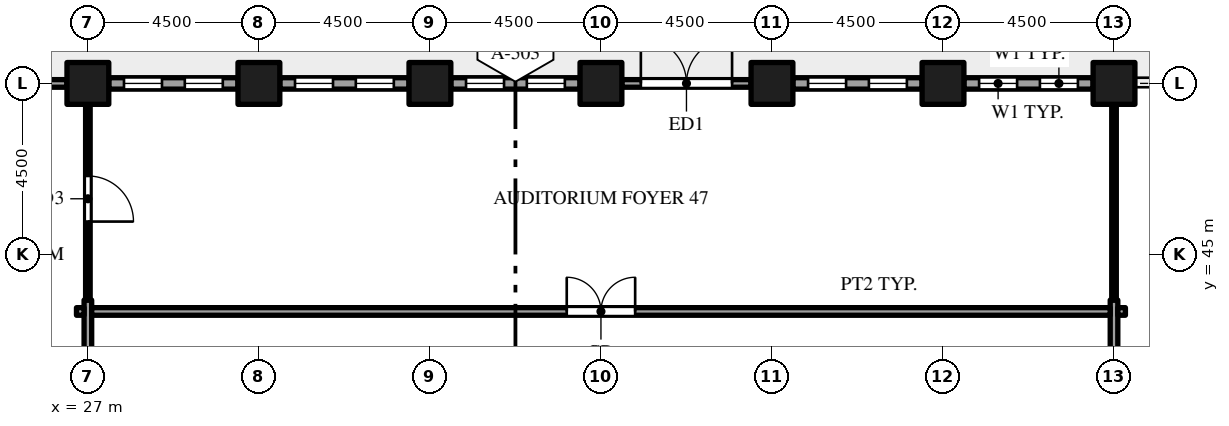
"""IFC4 building model, lengths in metres.
Left out: names, types, materials, properties, quantities, classifications, styles, units other than length and angle.
Written with IfcOpenShell. Run it as: python <this file> out.ifc"""

import sys

from ifc_helpers import new_model, si_unit, direction, frame, frame_2d, origin, origin_2d, place, context, subcontext, project, spatial, rectangle, hollow_rectangle, extrude, element, fill, save


model = new_model("IFC4")
c1 = context("Model", 3, precision=1e-05, world=origin(), true_north=direction((0.0, 1.0)))
c2 = subcontext(c1, "Body", "Model", "MODEL_VIEW")
j1 = project(units=[si_unit("LENGTHUNIT", "METRE"), si_unit("PLANEANGLEUNIT", "RADIAN")], contexts=[c1])
p1 = place(None, origin())
s1 = spatial("IfcSite", under=j1, at=p1, CompositionType="ELEMENT")
p2 = place(p1, origin())
s2 = spatial("IfcBuilding", under=s1, at=p2, CompositionType="ELEMENT")
p3 = place(p2, origin())
s3 = spatial("IfcBuildingStorey", under=s2, at=p3, CompositionType="ELEMENT", Elevation=0.0)
for number, where, z_axis, x_axis in (
    (1, (27.0, 49.5, -0.3), (0.0, 0.0, 1.0), (1.0, 0.0, 0.0)),
    (2, (31.5, 49.5, -0.3), (0.0, 0.0, 1.0), (1.0, 0.0, 0.0)),
    (3, (36.0, 49.5, -0.3), (0.0, 0.0, 1.0), (1.0, 0.0, 0.0)),
    (4, (40.5, 49.5, -0.3), (0.0, 0.0, 1.0), (1.0, 0.0, 0.0)),
    (5, (45.0, 49.5, -0.3), (0.0, 0.0, 1.0), (1.0, 0.0, 0.0)),
    (6, (49.5, 49.5, -0.3), (0.0, 0.0, 1.0), (1.0, 0.0, 0.0)),
    (7, (54.0, 49.5, -0.3), (0.0, 0.0, 1.0), (1.0, 0.0, 0.0)),
):
    element("IfcColumn", number, at=place(p3, frame(where, z_axis=z_axis, x_axis=x_axis)), inside=s3, PredefinedType="COLUMN", context=c2, shape_type="SweptSolid", body=[
        extrude(hollow_rectangle(XDim=1.1, YDim=1.1, WallThickness=0.06, at=origin_2d()), origin(), (0.0, 0.0, 1.0), 8.05),
    ])
p4 = place(p3, frame((53.45, 49.5, 0.0), z_axis=(0.0, 0.0, 1.0), x_axis=(-1.0, 0.0, 0.0)))
e8 = element("IfcWall", 8, at=p4, inside=s3, PredefinedType="STANDARD", context=c2, shape_type="SweptSolid", body=[
    extrude(rectangle(XDim=3.4, YDim=0.3, at=frame_2d((1.7, 0.0))), origin(), (0.0, 0.0, 1.0), 7.036),
])
p5 = place(p4, frame((0.4, 0.0, 0.9)))
e9 = element("IfcOpeningElement", 9, at=p5, cuts=e8, PredefinedType="OPENING", context=c2, shape_type="SweptSolid", body=[
    extrude(rectangle(XDim=1.0, YDim=3.5, at=frame_2d((0.5, 1.75))), frame((0.0, 0.16, 0.0), z_axis=(0.0, -1.0, 0.0), x_axis=(1.0, 0.0, 0.0)), (0.0, 0.0, 1.0), 0.32),
])
p6 = place(p4, frame((2.0, 0.0, 0.9)))
e10 = element("IfcOpeningElement", 10, at=p6, cuts=e8, PredefinedType="OPENING", context=c2, shape_type="SweptSolid", body=[
    extrude(rectangle(XDim=1.0, YDim=3.5, at=frame_2d((0.5, 1.75))), frame((0.0, 0.16, 0.0), z_axis=(0.0, -1.0, 0.0), x_axis=(1.0, 0.0, 0.0)), (0.0, 0.0, 1.0), 0.32),
])
p7 = place(p3, frame((48.95, 49.5, 0.0), z_axis=(0.0, 0.0, 1.0), x_axis=(-1.0, 0.0, 0.0)))
e11 = element("IfcWall", 11, at=p7, inside=s3, PredefinedType="STANDARD", context=c2, shape_type="SweptSolid", body=[
    extrude(rectangle(XDim=3.4, YDim=0.3, at=frame_2d((1.7, 0.0))), origin(), (0.0, 0.0, 1.0), 7.036),
])
p8 = place(p7, frame((0.4, 0.0, 0.9)))
e12 = element("IfcOpeningElement", 12, at=p8, cuts=e11, PredefinedType="OPENING", context=c2, shape_type="SweptSolid", body=[
    extrude(rectangle(XDim=1.0, YDim=3.5, at=frame_2d((0.5, 1.75))), frame((0.0, 0.16, 0.0), z_axis=(0.0, -1.0, 0.0), x_axis=(1.0, 0.0, 0.0)), (0.0, 0.0, 1.0), 0.32),
])
p9 = place(p7, frame((2.0, 0.0, 0.9)))
e13 = element("IfcOpeningElement", 13, at=p9, cuts=e11, PredefinedType="OPENING", context=c2, shape_type="SweptSolid", body=[
    extrude(rectangle(XDim=1.0, YDim=3.5, at=frame_2d((0.5, 1.75))), frame((0.0, 0.16, 0.0), z_axis=(0.0, -1.0, 0.0), x_axis=(1.0, 0.0, 0.0)), (0.0, 0.0, 1.0), 0.32),
])
p10 = place(p3, frame((41.05, 49.5, 0.0), z_axis=(0.0, 0.0, 1.0), x_axis=(1.0, 0.0, 0.0)))
e14 = element("IfcWall", 14, at=p10, inside=s3, PredefinedType="STANDARD", context=c2, shape_type="SweptSolid", body=[
    extrude(rectangle(XDim=3.4, YDim=0.2, at=frame_2d((1.7, 0.0))), origin(), (0.0, 0.0, 1.0), 7.036),
])
p11 = place(p10, frame((0.5, 0.0, 0.0)))
e15 = element("IfcOpeningElement", 15, at=p11, cuts=e14, PredefinedType="OPENING", context=c2, shape_type="SweptSolid", body=[
    extrude(rectangle(XDim=2.4, YDim=3.0, at=frame_2d((1.2, 1.5))), frame((0.0, 0.11, 0.0), z_axis=(0.0, -1.0, 0.0), x_axis=(1.0, 0.0, 0.0)), (0.0, 0.0, 1.0), 0.22),
])
p12 = place(p3, frame((39.95, 49.5, 0.0), z_axis=(0.0, 0.0, 1.0), x_axis=(-1.0, 0.0, 0.0)))
e16 = element("IfcWall", 16, at=p12, inside=s3, PredefinedType="STANDARD", context=c2, shape_type="SweptSolid", body=[
    extrude(rectangle(XDim=3.4, YDim=0.3, at=frame_2d((1.7, 0.0))), origin(), (0.0, 0.0, 1.0), 7.036),
])
p13 = place(p12, frame((0.4, 0.0, 0.9)))
e17 = element("IfcOpeningElement", 17, at=p13, cuts=e16, PredefinedType="OPENING", context=c2, shape_type="SweptSolid", body=[
    extrude(rectangle(XDim=1.0, YDim=3.5, at=frame_2d((0.5, 1.75))), frame((0.0, 0.16, 0.0), z_axis=(0.0, -1.0, 0.0), x_axis=(1.0, 0.0, 0.0)), (0.0, 0.0, 1.0), 0.32),
])
p14 = place(p12, frame((2.0, 0.0, 0.9)))
e18 = element("IfcOpeningElement", 18, at=p14, cuts=e16, PredefinedType="OPENING", context=c2, shape_type="SweptSolid", body=[
    extrude(rectangle(XDim=1.0, YDim=3.5, at=frame_2d((0.5, 1.75))), frame((0.0, 0.16, 0.0), z_axis=(0.0, -1.0, 0.0), x_axis=(1.0, 0.0, 0.0)), (0.0, 0.0, 1.0), 0.32),
])
p15 = place(p3, frame((35.45, 49.5, 0.0), z_axis=(0.0, 0.0, 1.0), x_axis=(-1.0, 0.0, 0.0)))
e19 = element("IfcWall", 19, at=p15, inside=s3, PredefinedType="STANDARD", context=c2, shape_type="SweptSolid", body=[
    extrude(rectangle(XDim=3.4, YDim=0.3, at=frame_2d((1.7, 0.0))), origin(), (0.0, 0.0, 1.0), 7.036),
])
p16 = place(p15, frame((0.4, 0.0, 0.9)))
e20 = element("IfcOpeningElement", 20, at=p16, cuts=e19, PredefinedType="OPENING", context=c2, shape_type="SweptSolid", body=[
    extrude(rectangle(XDim=1.0, YDim=3.5, at=frame_2d((0.5, 1.75))), frame((0.0, 0.16, 0.0), z_axis=(0.0, -1.0, 0.0), x_axis=(1.0, 0.0, 0.0)), (0.0, 0.0, 1.0), 0.32),
])
p17 = place(p15, frame((2.0, 0.0, 0.9)))
e21 = element("IfcOpeningElement", 21, at=p17, cuts=e19, PredefinedType="OPENING", context=c2, shape_type="SweptSolid", body=[
    extrude(rectangle(XDim=1.0, YDim=3.5, at=frame_2d((0.5, 1.75))), frame((0.0, 0.16, 0.0), z_axis=(0.0, -1.0, 0.0), x_axis=(1.0, 0.0, 0.0)), (0.0, 0.0, 1.0), 0.32),
])
p18 = place(p3, frame((30.95, 49.5, 0.0), z_axis=(0.0, 0.0, 1.0), x_axis=(-1.0, 0.0, 0.0)))
e22 = element("IfcWall", 22, at=p18, inside=s3, PredefinedType="STANDARD", context=c2, shape_type="SweptSolid", body=[
    extrude(rectangle(XDim=3.4, YDim=0.3, at=frame_2d((1.7, 0.0))), origin(), (0.0, 0.0, 1.0), 7.036),
])
p19 = place(p18, frame((0.4, 0.0, 0.9)))
e23 = element("IfcOpeningElement", 23, at=p19, cuts=e22, PredefinedType="OPENING", context=c2, shape_type="SweptSolid", body=[
    extrude(rectangle(XDim=1.0, YDim=3.5, at=frame_2d((0.5, 1.75))), frame((0.0, 0.16, 0.0), z_axis=(0.0, -1.0, 0.0), x_axis=(1.0, 0.0, 0.0)), (0.0, 0.0, 1.0), 0.32),
])
p20 = place(p18, frame((2.0, 0.0, 0.9)))
e24 = element("IfcOpeningElement", 24, at=p20, cuts=e22, PredefinedType="OPENING", context=c2, shape_type="SweptSolid", body=[
    extrude(rectangle(XDim=1.0, YDim=3.5, at=frame_2d((0.5, 1.75))), frame((0.0, 0.16, 0.0), z_axis=(0.0, -1.0, 0.0), x_axis=(1.0, 0.0, 0.0)), (0.0, 0.0, 1.0), 0.32),
])
p21 = place(p3, frame((22.501, 49.5, 0.0), z_axis=(0.0, 0.0, 1.0), x_axis=(1.0, 0.0, 0.0)))
e25 = element("IfcWall", 25, at=p21, inside=s3, PredefinedType="STANDARD", context=c2, shape_type="SweptSolid", body=[
    extrude(rectangle(XDim=3.949, YDim=0.2, at=frame_2d((1.975, 0.0))), origin(), (0.0, 0.0, 1.0), 7.036),
])
p22 = place(p21, frame((0.774, 0.0, 0.0)))
e26 = element("IfcOpeningElement", 26, at=p22, cuts=e25, PredefinedType="OPENING", context=c2, shape_type="SweptSolid", body=[
    extrude(rectangle(XDim=2.4, YDim=3.0, at=frame_2d((1.2, 1.5))), frame((0.0, 0.11, 0.0), z_axis=(0.0, -1.0, 0.0), x_axis=(1.0, 0.0, 0.0)), (0.0, 0.0, 1.0), 0.22),
])
p23 = place(p3, frame((27.0, 26.7, 0.0), z_axis=(0.0, 0.0, 1.0), x_axis=(0.0, 1.0, 0.0)))
e27 = element("IfcWall", 27, at=p23, inside=s3, PredefinedType="PARTITIONING", context=c2, shape_type="SweptSolid", body=[
    extrude(rectangle(XDim=17.1, YDim=0.2, at=frame_2d((8.55, 0.0))), origin(), (0.0, 0.0, 1.0), 6.66),
])
p24 = place(p3, frame((27.0, 43.8, 0.0), z_axis=(0.0, 0.0, 1.0), x_axis=(0.0, 1.0, 0.0)))
e28 = element("IfcWall", 28, at=p24, inside=s3, PredefinedType="PARTITIONING", context=c2, shape_type="SweptSolid", body=[
    extrude(rectangle(XDim=5.55, YDim=0.12, at=frame_2d((2.775, 0.0))), origin(), (0.0, 0.0, 1.0), 6.66),
])
p25 = place(p24, frame((2.065, 0.0, 0.0)))
e29 = element("IfcOpeningElement", 29, at=p25, cuts=e28, PredefinedType="OPENING", context=c2, shape_type="SweptSolid", body=[
    extrude(rectangle(XDim=1.2, YDim=2.1, at=frame_2d((0.6, 1.05))), frame((0.0, 0.07, 0.0), z_axis=(0.0, -1.0, 0.0), x_axis=(1.0, 0.0, 0.0)), (0.0, 0.0, 1.0), 0.14),
])
p26 = place(p3, frame((54.0, 26.7, 0.0), z_axis=(0.0, 0.0, 1.0), x_axis=(0.0, 1.0, 0.0)))
e30 = element("IfcWall", 30, at=p26, inside=s3, PredefinedType="PARTITIONING", context=c2, shape_type="SweptSolid", body=[
    extrude(rectangle(XDim=17.1, YDim=0.2, at=frame_2d((8.55, 0.0))), origin(), (0.0, 0.0, 1.0), 6.66),
])
p27 = place(p26, frame((7.65, 0.0, 0.0)))
e31 = element("IfcOpeningElement", 31, at=p27, cuts=e30, PredefinedType="OPENING", context=c2, shape_type="SweptSolid", body=[
    extrude(rectangle(XDim=1.8, YDim=2.1, at=frame_2d((0.9, 1.05))), frame((0.0, 0.11, 0.0), z_axis=(0.0, -1.0, 0.0), x_axis=(1.0, 0.0, 0.0)), (0.0, 0.0, 1.0), 0.22),
])
p28 = place(p3, frame((54.0, 43.8, 0.0), z_axis=(0.0, 0.0, 1.0), x_axis=(0.0, 1.0, 0.0)))
e32 = element("IfcWall", 32, at=p28, inside=s3, PredefinedType="PARTITIONING", context=c2, shape_type="SweptSolid", body=[
    extrude(rectangle(XDim=5.55, YDim=0.12, at=frame_2d((2.775, 0.0))), origin(), (0.0, 0.0, 1.0), 6.66),
])
p29 = place(p3, frame((26.7, 43.5, 0.0), z_axis=(0.0, 0.0, 1.0), x_axis=(1.0, 0.0, 0.0)))
e33 = element("IfcWall", 33, at=p29, inside=s3, PredefinedType="PARTITIONING", context=c2, shape_type="SweptSolid", body=[
    extrude(rectangle(XDim=0.2, YDim=0.2, at=frame_2d((0.1, 0.0))), origin(), (0.0, 0.0, 1.0), 6.66),
])
p30 = place(p3, frame((27.1, 43.5, 0.0), z_axis=(0.0, 0.0, 1.0), x_axis=(1.0, 0.0, 0.0)))
e34 = element("IfcWall", 34, at=p30, inside=s3, PredefinedType="PARTITIONING", context=c2, shape_type="SweptSolid", body=[
    extrude(rectangle(XDim=26.8, YDim=0.2, at=frame_2d((13.4, 0.0))), origin(), (0.0, 0.0, 1.0), 6.66),
])
p31 = place(p30, frame((12.5, 0.0, 0.0)))
e35 = element("IfcOpeningElement", 35, at=p31, cuts=e34, PredefinedType="OPENING", context=c2, shape_type="SweptSolid", body=[
    extrude(rectangle(XDim=1.8, YDim=2.1, at=frame_2d((0.9, 1.05))), frame((0.0, 0.11, 0.0), z_axis=(0.0, -1.0, 0.0), x_axis=(1.0, 0.0, 0.0)), (0.0, 0.0, 1.0), 0.22),
])
p32 = place(p3, frame((54.1, 43.5, 0.0), z_axis=(0.0, 0.0, 1.0), x_axis=(1.0, 0.0, 0.0)))
e36 = element("IfcWall", 36, at=p32, inside=s3, PredefinedType="PARTITIONING", context=c2, shape_type="SweptSolid", body=[
    extrude(rectangle(XDim=0.2, YDim=0.2, at=frame_2d((0.1, 0.0))), origin(), (0.0, 0.0, 1.0), 6.66),
])
p33 = place(p5, origin())
e37 = element("IfcWindow", 37, at=p33, inside=s3, PartitioningType="SINGLE_PANEL", PredefinedType="WINDOW", context=c2, shape_type="SweptSolid", body=[
    extrude(rectangle(XDim=1.0, YDim=3.5, at=frame_2d((0.5, 1.75))), frame((0.0, 0.03, 0.0), z_axis=(0.0, -1.0, 0.0), x_axis=(1.0, 0.0, 0.0)), (0.0, 0.0, 1.0), 0.06),
])
fill(e9, e37)
p34 = place(p6, origin())
e38 = element("IfcWindow", 38, at=p34, inside=s3, PartitioningType="SINGLE_PANEL", PredefinedType="WINDOW", context=c2, shape_type="SweptSolid", body=[
    extrude(rectangle(XDim=1.0, YDim=3.5, at=frame_2d((0.5, 1.75))), frame((0.0, 0.03, 0.0), z_axis=(0.0, -1.0, 0.0), x_axis=(1.0, 0.0, 0.0)), (0.0, 0.0, 1.0), 0.06),
])
fill(e10, e38)
p35 = place(p8, origin())
e39 = element("IfcWindow", 39, at=p35, inside=s3, PartitioningType="SINGLE_PANEL", PredefinedType="WINDOW", context=c2, shape_type="SweptSolid", body=[
    extrude(rectangle(XDim=1.0, YDim=3.5, at=frame_2d((0.5, 1.75))), frame((0.0, 0.03, 0.0), z_axis=(0.0, -1.0, 0.0), x_axis=(1.0, 0.0, 0.0)), (0.0, 0.0, 1.0), 0.06),
])
fill(e12, e39)
p36 = place(p9, origin())
e40 = element("IfcWindow", 40, at=p36, inside=s3, PartitioningType="SINGLE_PANEL", PredefinedType="WINDOW", context=c2, shape_type="SweptSolid", body=[
    extrude(rectangle(XDim=1.0, YDim=3.5, at=frame_2d((0.5, 1.75))), frame((0.0, 0.03, 0.0), z_axis=(0.0, -1.0, 0.0), x_axis=(1.0, 0.0, 0.0)), (0.0, 0.0, 1.0), 0.06),
])
fill(e13, e40)
p37 = place(p11, origin())
e41 = element("IfcDoor", 41, at=p37, inside=s3, OperationType="DOUBLE_DOOR_SINGLE_SWING", PredefinedType="DOOR", context=c2, shape_type="SweptSolid", body=[
    extrude(rectangle(XDim=2.4, YDim=3.0, at=frame_2d((1.2, 1.5))), frame((0.0, 0.025, 0.0), z_axis=(0.0, -1.0, 0.0), x_axis=(1.0, 0.0, 0.0)), (0.0, 0.0, 1.0), 0.05),
])
fill(e15, e41)
p38 = place(p13, origin())
e42 = element("IfcWindow", 42, at=p38, inside=s3, PartitioningType="SINGLE_PANEL", PredefinedType="WINDOW", context=c2, shape_type="SweptSolid", body=[
    extrude(rectangle(XDim=1.0, YDim=3.5, at=frame_2d((0.5, 1.75))), frame((0.0, 0.03, 0.0), z_axis=(0.0, -1.0, 0.0), x_axis=(1.0, 0.0, 0.0)), (0.0, 0.0, 1.0), 0.06),
])
fill(e17, e42)
p39 = place(p14, origin())
e43 = element("IfcWindow", 43, at=p39, inside=s3, PartitioningType="SINGLE_PANEL", PredefinedType="WINDOW", context=c2, shape_type="SweptSolid", body=[
    extrude(rectangle(XDim=1.0, YDim=3.5, at=frame_2d((0.5, 1.75))), frame((0.0, 0.03, 0.0), z_axis=(0.0, -1.0, 0.0), x_axis=(1.0, 0.0, 0.0)), (0.0, 0.0, 1.0), 0.06),
])
fill(e18, e43)
p40 = place(p16, origin())
e44 = element("IfcWindow", 44, at=p40, inside=s3, PartitioningType="SINGLE_PANEL", PredefinedType="WINDOW", context=c2, shape_type="SweptSolid", body=[
    extrude(rectangle(XDim=1.0, YDim=3.5, at=frame_2d((0.5, 1.75))), frame((0.0, 0.03, 0.0), z_axis=(0.0, -1.0, 0.0), x_axis=(1.0, 0.0, 0.0)), (0.0, 0.0, 1.0), 0.06),
])
fill(e20, e44)
p41 = place(p17, origin())
e45 = element("IfcWindow", 45, at=p41, inside=s3, PartitioningType="SINGLE_PANEL", PredefinedType="WINDOW", context=c2, shape_type="SweptSolid", body=[
    extrude(rectangle(XDim=1.0, YDim=3.5, at=frame_2d((0.5, 1.75))), frame((0.0, 0.03, 0.0), z_axis=(0.0, -1.0, 0.0), x_axis=(1.0, 0.0, 0.0)), (0.0, 0.0, 1.0), 0.06),
])
fill(e21, e45)
p42 = place(p19, origin())
e46 = element("IfcWindow", 46, at=p42, inside=s3, PartitioningType="SINGLE_PANEL", PredefinedType="WINDOW", context=c2, shape_type="SweptSolid", body=[
    extrude(rectangle(XDim=1.0, YDim=3.5, at=frame_2d((0.5, 1.75))), frame((0.0, 0.03, 0.0), z_axis=(0.0, -1.0, 0.0), x_axis=(1.0, 0.0, 0.0)), (0.0, 0.0, 1.0), 0.06),
])
fill(e23, e46)
p43 = place(p20, origin())
e47 = element("IfcWindow", 47, at=p43, inside=s3, PartitioningType="SINGLE_PANEL", PredefinedType="WINDOW", context=c2, shape_type="SweptSolid", body=[
    extrude(rectangle(XDim=1.0, YDim=3.5, at=frame_2d((0.5, 1.75))), frame((0.0, 0.03, 0.0), z_axis=(0.0, -1.0, 0.0), x_axis=(1.0, 0.0, 0.0)), (0.0, 0.0, 1.0), 0.06),
])
fill(e24, e47)
p44 = place(p31, origin())
e48 = element("IfcDoor", 48, at=p44, inside=s3, OperationType="DOUBLE_DOOR_SINGLE_SWING", PredefinedType="DOOR", context=c2, shape_type="SweptSolid", body=[
    extrude(rectangle(XDim=1.8, YDim=2.1, at=frame_2d((0.9, 1.05))), frame((0.0, 0.025, 0.0), z_axis=(0.0, -1.0, 0.0), x_axis=(1.0, 0.0, 0.0)), (0.0, 0.0, 1.0), 0.05),
])
fill(e35, e48)
p45 = place(p25, origin())
e49 = element("IfcDoor", 49, at=p45, inside=s3, OperationType="SINGLE_SWING_LEFT", PredefinedType="DOOR", context=c2, shape_type="SweptSolid", body=[
    extrude(rectangle(XDim=1.2, YDim=2.1, at=frame_2d((0.6, 1.05))), frame((0.0, 0.025, 0.0), z_axis=(0.0, -1.0, 0.0), x_axis=(1.0, 0.0, 0.0)), (0.0, 0.0, 1.0), 0.05),
])
fill(e29, e49)
save(model, sys.argv[1])
